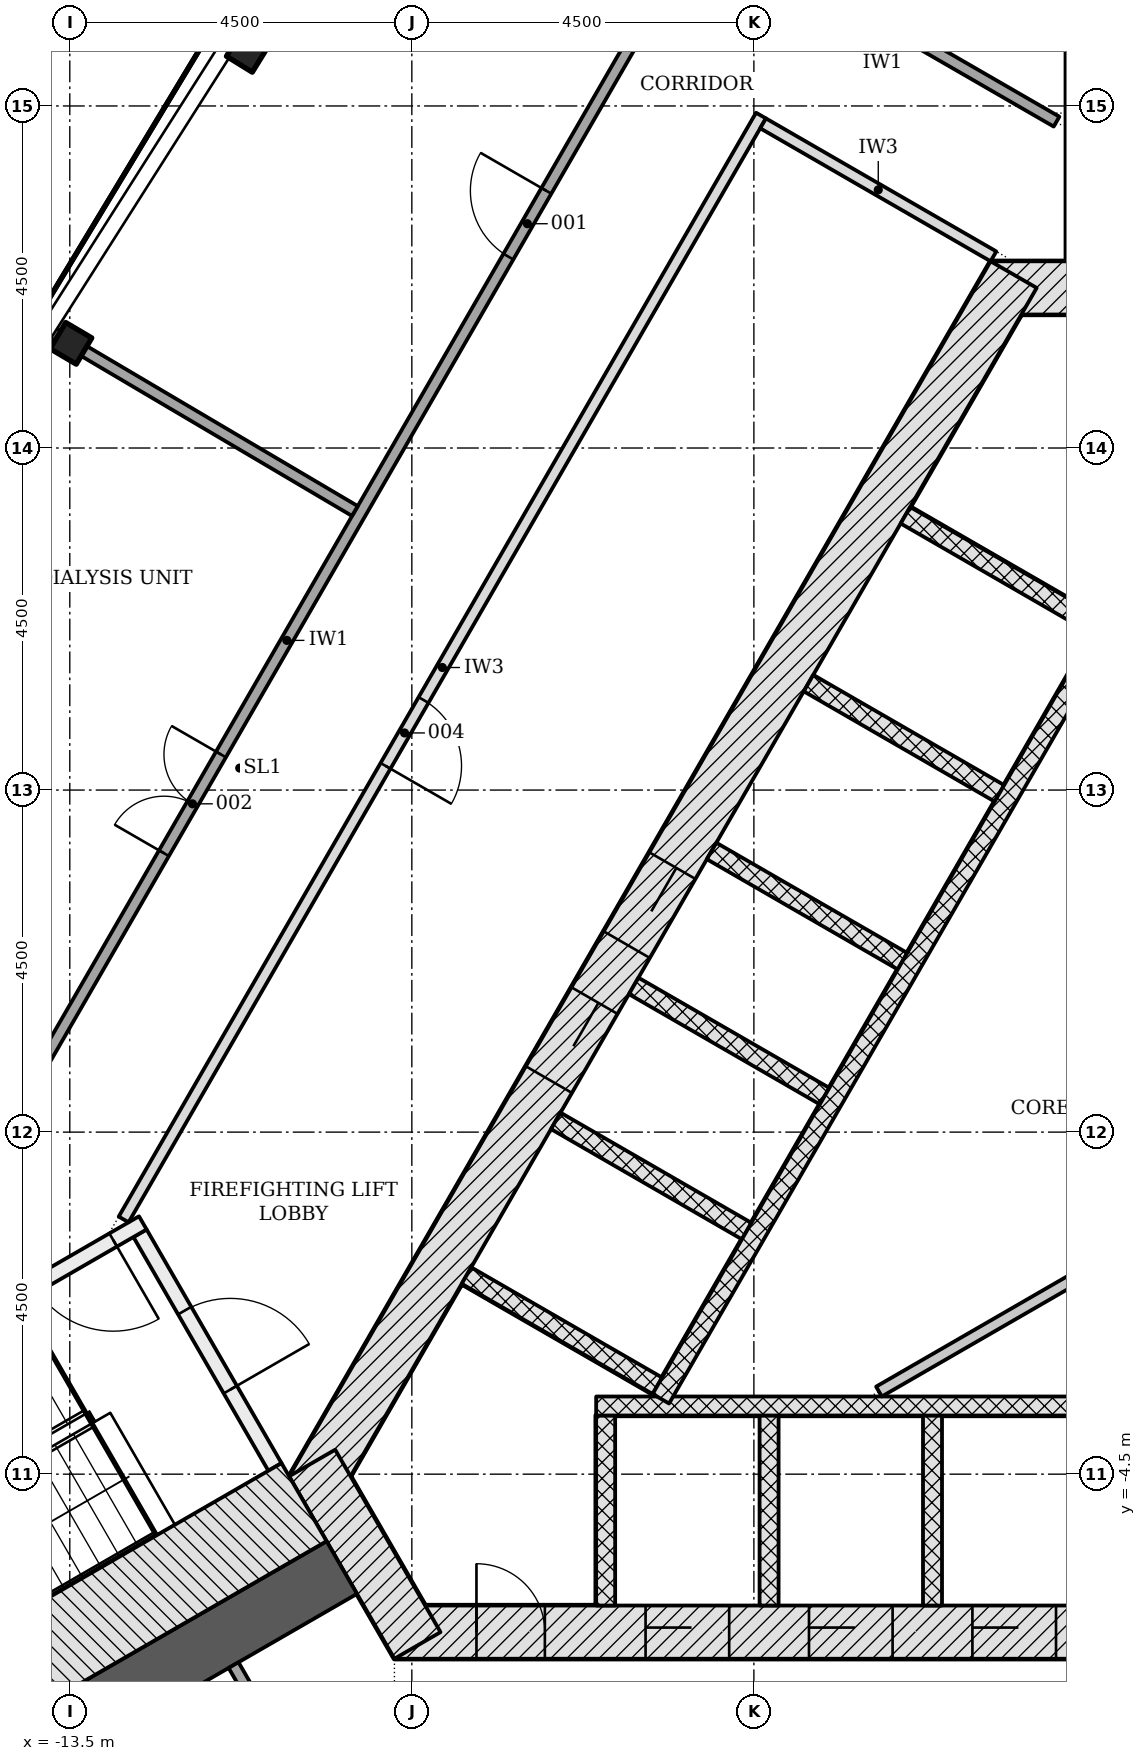
"""IFC4 building model, lengths in metres.
Left out: names, types, materials, properties, quantities, classifications, styles, units other than length and angle.
Written with IfcOpenShell. Run it as: python <this file> out.ifc"""

import sys

from ifc_helpers import new_model, si_unit, direction, frame, frame_2d, origin, origin_2d, place, context, subcontext, project, spatial, rectangle, i_section, extrude, element, fill, save


model = new_model("IFC4")
c1 = context("Model", 3, precision=1e-05, world=origin(), true_north=direction((0.0, 1.0)))
c2 = subcontext(c1, "Body", "Model", "MODEL_VIEW")
j1 = project(units=[si_unit("LENGTHUNIT", "METRE"), si_unit("PLANEANGLEUNIT", "RADIAN")], contexts=[c1])
p1 = place(None, origin())
s1 = spatial("IfcSite", under=j1, at=p1, CompositionType="ELEMENT")
p2 = place(p1, origin())
s2 = spatial("IfcBuilding", under=s1, at=p2, CompositionType="ELEMENT")
p3 = place(p2, frame((0.0, 0.0, 98.7)))
s3 = spatial("IfcBuildingStorey", under=s2, at=p3, CompositionType="ELEMENT", Elevation=98.7)
p4 = place(p3, frame((-9.229, -6.578, -0.2), z_axis=(0.0, 0.0, 1.0), x_axis=(1.0, 0.0, 0.0)))
e1 = element("IfcWall", 1, at=p4, inside=s3, PredefinedType="SHEAR", context=c2, shape_type="SweptSolid", body=[
    extrude(rectangle(XDim=18.458, YDim=0.7, at=frame_2d((9.229, 0.0))), origin(), (0.0, 0.0, 1.0), 3.6),
])
p5 = place(p4, frame((3.304, 0.0, 0.2)))
e2 = element("IfcOpeningElement", 2, at=p5, cuts=e1, PredefinedType="OPENING", context=c2, shape_type="SweptSolid", body=[
    extrude(rectangle(XDim=1.1, YDim=2.1, at=frame_2d((0.55, 1.05))), frame((0.0, 0.36, 0.0), z_axis=(0.0, -1.0, 0.0), x_axis=(1.0, 0.0, 0.0)), (0.0, 0.0, 1.0), 0.72),
])
p6 = place(p4, frame((5.454, 0.0, 0.2)))
e3 = element("IfcOpeningElement", 3, at=p6, cuts=e1, PredefinedType="OPENING", context=c2, shape_type="SweptSolid", body=[
    extrude(rectangle(XDim=1.1, YDim=2.1, at=frame_2d((0.55, 1.05))), frame((0.0, 0.36, 0.0), z_axis=(0.0, -1.0, 0.0), x_axis=(1.0, 0.0, 0.0)), (0.0, 0.0, 1.0), 0.72),
])
p7 = place(p4, frame((7.604, 0.0, 0.2)))
e4 = element("IfcOpeningElement", 4, at=p7, cuts=e1, PredefinedType="OPENING", context=c2, shape_type="SweptSolid", body=[
    extrude(rectangle(XDim=1.1, YDim=2.1, at=frame_2d((0.55, 1.05))), frame((0.0, 0.36, 0.0), z_axis=(0.0, -1.0, 0.0), x_axis=(1.0, 0.0, 0.0)), (0.0, 0.0, 1.0), 0.72),
])
p8 = place(p4, frame((9.754, 0.0, 0.2)))
e5 = element("IfcOpeningElement", 5, at=p8, cuts=e1, PredefinedType="OPENING", context=c2, shape_type="SweptSolid", body=[
    extrude(rectangle(XDim=1.1, YDim=2.1, at=frame_2d((0.55, 1.05))), frame((0.0, 0.36, 0.0), z_axis=(0.0, -1.0, 0.0), x_axis=(1.0, 0.0, 0.0)), (0.0, 0.0, 1.0), 0.72),
])
p9 = place(p4, frame((11.904, 0.0, 0.2)))
e6 = element("IfcOpeningElement", 6, at=p9, cuts=e1, PredefinedType="OPENING", context=c2, shape_type="SweptSolid", body=[
    extrude(rectangle(XDim=1.1, YDim=2.1, at=frame_2d((0.55, 1.05))), frame((0.0, 0.36, 0.0), z_axis=(0.0, -1.0, 0.0), x_axis=(1.0, 0.0, 0.0)), (0.0, 0.0, 1.0), 0.72),
])
p10 = place(p4, frame((14.054, 0.0, 0.2)))
e7 = element("IfcOpeningElement", 7, at=p10, cuts=e1, PredefinedType="OPENING", context=c2, shape_type="SweptSolid", body=[
    extrude(rectangle(XDim=1.1, YDim=2.1, at=frame_2d((0.55, 1.05))), frame((0.0, 0.36, 0.0), z_axis=(0.0, -1.0, 0.0), x_axis=(1.0, 0.0, 0.0)), (0.0, 0.0, 1.0), 0.72),
])
p11 = place(p4, frame((1.079, 0.0, 0.2)))
e8 = element("IfcOpeningElement", 8, at=p11, cuts=e1, PredefinedType="OPENING", context=c2, shape_type="SweptSolid", body=[
    extrude(rectangle(XDim=0.9, YDim=2.1, at=frame_2d((0.45, 1.05))), frame((0.0, 0.36, 0.0), z_axis=(0.0, -1.0, 0.0), x_axis=(1.0, 0.0, 0.0)), (0.0, 0.0, 1.0), 0.72),
])
p12 = place(p3, frame((1.386, 11.106, -0.2), z_axis=(0.0, 0.0, 1.0), x_axis=(-1.0, 0.0, 0.0)))
e9 = element("IfcWall", 9, at=p12, inside=s3, PredefinedType="SHEAR", context=c2, shape_type="SweptSolid", body=[
    extrude(rectangle(XDim=2.771, YDim=0.7, at=frame_2d((1.386, 0.0))), origin(), (0.0, 0.0, 1.0), 3.6),
])
p13 = place(p3, frame((-1.083, 11.281, -0.2), z_axis=(0.0, 0.0, 1.0), x_axis=(-0.500001446645, -0.866024568562, 0.0)))
e10 = element("IfcWall", 10, at=p13, inside=s3, PredefinedType="SHEAR", context=c2, shape_type="SweptSolid", body=[
    extrude(rectangle(XDim=18.458, YDim=0.7, at=frame_2d((9.229, 0.0))), origin(), (0.0, 0.0, 1.0), 3.6),
])
p14 = place(p13, frame((8.979, 0.0, 0.2)))
e11 = element("IfcOpeningElement", 11, at=p14, cuts=e10, PredefinedType="OPENING", context=c2, shape_type="SweptSolid", body=[
    extrude(rectangle(XDim=1.2, YDim=2.1, at=frame_2d((0.6, 1.05))), frame((0.0, 0.36, 0.0), z_axis=(0.0, -1.0, 0.0), x_axis=(1.0, 0.0, 0.0)), (0.0, 0.0, 1.0), 0.72),
])
p15 = place(p13, frame((11.029, 0.0, 0.2)))
e12 = element("IfcOpeningElement", 12, at=p15, cuts=e10, PredefinedType="OPENING", context=c2, shape_type="SweptSolid", body=[
    extrude(rectangle(XDim=1.2, YDim=2.1, at=frame_2d((0.6, 1.05))), frame((0.0, 0.36, 0.0), z_axis=(0.0, -1.0, 0.0), x_axis=(1.0, 0.0, 0.0)), (0.0, 0.0, 1.0), 0.72),
])
p16 = place(p3, frame((-10.311, -4.353, -0.2), z_axis=(0.0, 0.0, 1.0), x_axis=(0.500042739161, -0.866000726912, 0.0)))
e13 = element("IfcWall", 13, at=p16, inside=s3, PredefinedType="SHEAR", context=c2, shape_type="SweptSolid", body=[
    extrude(rectangle(XDim=2.771, YDim=0.7, at=frame_2d((1.386, 0.0))), origin(), (0.0, 0.0, 1.0), 3.6),
])
p17 = place(p3, frame((0.0, 11.456, -0.2), z_axis=(0.0, 0.0, 1.0), x_axis=(0.0, 1.0, 0.0)))
e14 = element("IfcWall", 14, at=p17, inside=s3, PredefinedType="SHEAR", context=c2, shape_type="SweptSolid", body=[
    extrude(rectangle(XDim=12.678, YDim=0.8, at=frame_2d((6.339, 0.0))), origin(), (0.0, 0.0, 1.0), 3.6),
])
p18 = place(p3, frame((-9.922, -5.728, -0.2), z_axis=(0.0, 0.0, 1.0), x_axis=(-0.866029086277, -0.499993621681, 0.0)))
e15 = element("IfcWall", 15, at=p18, inside=s3, PredefinedType="SHEAR", context=c2, shape_type="SweptSolid", body=[
    extrude(rectangle(XDim=12.677, YDim=0.8, at=frame_2d((6.339, 0.0))), origin(), (0.0, 0.0, 1.0), 3.6),
])
for number, where, z_axis, x_axis in (
    (16, (-11.164, 14.22, -0.2), (0.0, 0.0, 1.0), (-0.525, -0.851, 0.0)),
    (17, (-13.484, 10.377, -0.2), (0.0, 0.0, 1.0), (-0.508, -0.861, 0.0)),
):
    element("IfcColumn", number, at=place(p3, frame(where, z_axis=z_axis, x_axis=x_axis)), inside=s3, PredefinedType="COLUMN", context=c2, shape_type="SweptSolid", body=[
        extrude(i_section(OverallWidth=0.401, OverallDepth=0.399, WebThickness=0.025, FlangeThickness=0.04, FilletRadius=0.015, at=origin_2d()), origin(), (0.0, 0.0, 1.0), 3.6),
    ])
for number, where, z_axis, x_axis in (
    (18, (-6.45, -6.228, -0.2), (0.0, 0.0, 1.0), (0.0, 1.0, 0.0)),
    (19, (-4.3, -6.228, -0.2), (0.0, 0.0, 1.0), (0.0, 1.0, 0.0)),
    (20, (-2.15, -6.228, -0.2), (0.0, 0.0, 1.0), (0.0, 1.0, 0.0)),
):
    element("IfcWall", number, at=place(p3, frame(where, z_axis=z_axis, x_axis=x_axis)), inside=s3, PredefinedType="PARTITIONING", context=c2, shape_type="SweptSolid", body=[
        extrude(rectangle(XDim=2.5, YDim=0.25, at=frame_2d((1.25, 0.0))), origin(), (0.0, 0.0, 1.0), 3.6),
    ])
p19 = place(p3, frame((-6.575, -3.603, 0.0), z_axis=(0.0, 0.0, 1.0), x_axis=(1.0, 0.0, 0.0)))
e21 = element("IfcWall", 21, at=p19, inside=s3, PredefinedType="PARTITIONING", context=c2, shape_type="SweptSolid", body=[
    extrude(rectangle(XDim=13.15, YDim=0.25, at=frame_2d((6.575, 0.0))), origin(), (0.0, 0.0, 1.0), 3.4),
])
p20 = place(p3, frame((-2.506, 8.115, -0.2), z_axis=(0.0, 0.0, 1.0), x_axis=(0.865996321171, -0.50005036918, 0.0)))
e22 = element("IfcWall", 22, at=p20, inside=s3, PredefinedType="PARTITIONING", context=c2, shape_type="SweptSolid", body=[
    extrude(rectangle(XDim=2.9, YDim=0.25, at=frame_2d((1.45, 0.0))), origin(), (0.0, 0.0, 1.0), 3.6),
])
for number, where, z_axis, x_axis in (
    (23, (-3.781, 5.907, -0.2), (0.0, 0.0, 1.0), (0.866, -0.5, 0.0)),
    (24, (-5.056, 3.699, -0.2), (0.0, 0.0, 1.0), (0.866, -0.5, 0.0)),
    (25, (-6.081, 1.923, -0.2), (0.0, 0.0, 1.0), (0.866, -0.5, 0.0)),
    (26, (-7.106, 0.148, -0.2), (0.0, 0.0, 1.0), (0.866, -0.5, 0.0)),
    (27, (-8.281, -1.887, -0.2), (0.0, 0.0, 1.0), (0.866, -0.5, 0.0)),
):
    element("IfcWall", number, at=place(p3, frame(where, z_axis=z_axis, x_axis=x_axis)), inside=s3, PredefinedType="PARTITIONING", context=c2, shape_type="SweptSolid", body=[
        extrude(rectangle(XDim=2.9, YDim=0.25, at=frame_2d((1.45, 0.0))), origin(), (0.0, 0.0, 1.0), 3.6),
    ])
p21 = place(p3, frame((0.176, 6.711, 0.0), z_axis=(0.0, 0.0, 1.0), x_axis=(-0.500004227369, -0.866022963098, 0.0)))
e28 = element("IfcWall", 28, at=p21, inside=s3, PredefinedType="PARTITIONING", context=c2, shape_type="SweptSolid", body=[
    extrude(rectangle(XDim=11.8, YDim=0.25, at=frame_2d((5.9, 0.0))), origin(), (0.0, 0.0, 1.0), 3.4),
])
p22 = place(p3, frame((-2.854, -3.413, 0.0), z_axis=(0.0, 0.0, 1.0), x_axis=(0.866030102318, 0.499991861813, 0.0)))
e29 = element("IfcWall", 29, at=p22, inside=s3, PredefinedType="PARTITIONING", context=c2, shape_type="SweptSolid", body=[
    extrude(rectangle(XDim=10.407, YDim=0.15, at=frame_2d((5.204, 0.0))), origin(), (0.0, 0.0, 1.0), 3.4),
])
p23 = place(p22, frame((3.354, 0.0, 0.0)))
e30 = element("IfcOpeningElement", 30, at=p23, cuts=e29, PredefinedType="OPENING", context=c2, shape_type="SweptSolid", body=[
    extrude(rectangle(XDim=0.9, YDim=2.1, at=frame_2d((0.45, 1.05))), frame((0.0, 0.085, 0.0), z_axis=(0.0, -1.0, 0.0), x_axis=(1.0, 0.0, 0.0)), (0.0, 0.0, 1.0), 0.17),
])
p24 = place(p3, frame((-12.576, -1.331, -0.2), z_axis=(0.0, 0.0, 1.0), x_axis=(0.499970499736, -0.8660424351, 0.0)))
e31 = element("IfcWall", 31, at=p24, inside=s3, PredefinedType="SHEAR", context=c2, shape_type="SweptSolid", body=[
    extrude(rectangle(XDim=3.55, YDim=0.2, at=frame_2d((1.775, 0.0))), origin(), (0.0, 0.0, 1.0), 3.6),
])
p25 = place(p24, frame((1.175, 0.0, 0.2)))
e32 = element("IfcOpeningElement", 32, at=p25, cuts=e31, PredefinedType="OPENING", context=c2, shape_type="SweptSolid", body=[
    extrude(rectangle(XDim=1.2, YDim=2.1, at=frame_2d((0.6, 1.05))), frame((0.0, 0.11, 0.0), z_axis=(0.0, -1.0, 0.0), x_axis=(1.0, 0.0, 0.0)), (0.0, 0.0, 1.0), 0.22),
])
p26 = place(p3, frame((-12.539, -1.194, -0.2), z_axis=(0.0, 0.0, 1.0), x_axis=(-0.866045472092, -0.499965239061, 0.0)))
e33 = element("IfcWall", 33, at=p26, inside=s3, PredefinedType="SHEAR", context=c2, shape_type="SweptSolid", body=[
    extrude(rectangle(XDim=5.6, YDim=0.2, at=frame_2d((2.8, 0.0))), origin(), (0.0, 0.0, 1.0), 3.6),
])
p27 = place(p26, frame((0.45, 0.0, 0.2)))
e34 = element("IfcOpeningElement", 34, at=p27, cuts=e33, PredefinedType="OPENING", context=c2, shape_type="SweptSolid", body=[
    extrude(rectangle(XDim=1.2, YDim=2.1, at=frame_2d((0.6, 1.05))), frame((0.0, 0.11, 0.0), z_axis=(0.0, -1.0, 0.0), x_axis=(1.0, 0.0, 0.0)), (0.0, 0.0, 1.0), 0.22),
])
p28 = place(p3, frame((-10.418, -4.868, -0.2), z_axis=(0.0, 0.0, 1.0), x_axis=(-0.866018442252, -0.500012057535, 0.0)))
e35 = element("IfcWall", 35, at=p28, inside=s3, PredefinedType="SHEAR", context=c2, shape_type="SweptSolid", body=[
    extrude(rectangle(XDim=7.2, YDim=1.186, at=frame_2d((3.6, 0.0))), origin(), (0.0, 0.0, 1.0), 3.6),
])
p29 = place(p3, frame((-16.169, -3.099, 0.0), z_axis=(0.0, 0.0, 1.0), x_axis=(0.499999805269, 0.866025516212, 0.0)))
e36 = element("IfcWall", 36, at=p29, inside=s3, PredefinedType="PARTITIONING", context=c2, shape_type="SweptSolid", body=[
    extrude(rectangle(XDim=22.097, YDim=0.15, at=frame_2d((11.049, 0.0))), origin(), (0.0, 0.0, 1.0), 2.778),
])
p30 = place(p29, frame((16.878, 0.0, 0.0)))
e37 = element("IfcOpeningElement", 37, at=p30, cuts=e36, PredefinedType="OPENING", context=c2, shape_type="SweptSolid", body=[
    extrude(rectangle(XDim=1.0, YDim=2.1, at=frame_2d((0.5, 1.05))), frame((0.0, 0.085, 0.0), z_axis=(0.0, -1.0, 0.0), x_axis=(1.0, 0.0, 0.0)), (0.0, 0.0, 1.0), 0.17),
])
p31 = place(p29, frame((7.816, 0.0, 0.0)))
e38 = element("IfcOpeningElement", 38, at=p31, cuts=e36, PredefinedType="OPENING", context=c2, shape_type="SweptSolid", body=[
    extrude(rectangle(XDim=1.5, YDim=2.1, at=frame_2d((0.75, 1.05))), frame((0.0, 0.085, 0.0), z_axis=(0.0, -1.0, 0.0), x_axis=(1.0, 0.0, 0.0)), (0.0, 0.0, 1.0), 0.17),
])
p32 = place(p29, frame((1.2, 0.0, 0.0)))
e39 = element("IfcOpeningElement", 39, at=p32, cuts=e36, PredefinedType="OPENING", context=c2, shape_type="SweptSolid", body=[
    extrude(rectangle(XDim=1.5, YDim=2.1, at=frame_2d((0.75, 1.05))), frame((0.0, 0.085, 0.0), z_axis=(0.0, -1.0, 0.0), x_axis=(1.0, 0.0, 0.0)), (0.0, 0.0, 1.0), 0.17),
])
p33 = place(p3, frame((-4.407, 13.374, 0.0), z_axis=(0.0, 0.0, 1.0), x_axis=(-0.499997181693, -0.866027030928, 0.0)))
e40 = element("IfcWall", 40, at=p33, inside=s3, PredefinedType="PARTITIONING", context=c2, shape_type="SweptSolid", body=[
    extrude(rectangle(XDim=16.77, YDim=0.15, at=frame_2d((8.385, 0.0))), origin(), (0.0, 0.0, 1.0), 2.778),
])
p34 = place(p33, frame((8.879, 0.0, 0.0)))
e41 = element("IfcOpeningElement", 41, at=p34, cuts=e40, PredefinedType="OPENING", context=c2, shape_type="SweptSolid", body=[
    extrude(rectangle(XDim=1.0, YDim=2.1, at=frame_2d((0.5, 1.05))), frame((0.0, 0.085, 0.0), z_axis=(0.0, -1.0, 0.0), x_axis=(1.0, 0.0, 0.0)), (0.0, 0.0, 1.0), 0.17),
])
p35 = place(p3, frame((-5.093, 15.935, 0.0), z_axis=(0.0, 0.0, 1.0), x_axis=(0.866033195618, -0.499986503906, 0.0)))
e42 = element("IfcWall", 42, at=p35, inside=s3, PredefinedType="PARTITIONING", context=c2, shape_type="SweptSolid", body=[
    extrude(rectangle(XDim=5.282, YDim=0.15, at=frame_2d((2.641, 0.0))), origin(), (0.0, 0.0, 1.0), 3.4),
])
p36 = place(p35, frame((1.816, 0.0, 0.0)))
e43 = element("IfcOpeningElement", 43, at=p36, cuts=e42, PredefinedType="OPENING", context=c2, shape_type="SweptSolid", body=[
    extrude(rectangle(XDim=1.5, YDim=2.1, at=frame_2d((0.75, 1.05))), frame((0.0, 0.085, 0.0), z_axis=(0.0, -1.0, 0.0), x_axis=(1.0, 0.0, 0.0)), (0.0, 0.0, 1.0), 0.17),
])
p37 = place(p3, frame((-4.379, 13.271, 0.0), z_axis=(0.0, 0.0, 1.0), x_axis=(0.866019471182, -0.500010275428, 0.0)))
e44 = element("IfcWall", 44, at=p37, inside=s3, PredefinedType="PARTITIONING", context=c2, shape_type="SweptSolid", body=[
    extrude(rectangle(XDim=3.5, YDim=0.15, at=frame_2d((1.75, 0.0))), origin(), (0.0, 0.0, 1.0), 3.4),
])
p38 = place(p3, frame((-11.345, -7.012, 0.0), z_axis=(0.0, 0.0, 1.0), x_axis=(0.499998569178, -0.866026229868, 0.0)))
e45 = element("IfcWall", 45, at=p38, inside=s3, PredefinedType="PARTITIONING", context=c2, shape_type="SweptSolid", body=[
    extrude(rectangle(XDim=2.143, YDim=0.15, at=frame_2d((1.072, 0.0))), origin(), (0.0, 0.0, 1.0), 2.778),
])
p39 = place(p3, frame((-23.909, 16.533, 0.0), z_axis=(0.0, 0.0, 1.0), x_axis=(0.86106275482, -0.508498704288, 0.0)))
e46 = element("IfcWall", 46, at=p39, inside=s3, PredefinedType="PARTITIONING", context=c2, shape_type="SweptSolid", body=[
    extrude(rectangle(XDim=16.444, YDim=0.15, at=frame_2d((8.222, 0.0))), origin(), (0.0, 0.0, 1.0), 2.778),
])
p40 = place(p5, origin())
e47 = element("IfcDoor", 47, at=p40, inside=s3, OperationType="DOUBLE_DOOR_SLIDING", PredefinedType="DOOR", context=c2, shape_type="SweptSolid", body=[
    extrude(rectangle(XDim=1.1, YDim=2.1, at=frame_2d((0.55, 1.05))), frame((0.0, 0.025, 0.0), z_axis=(0.0, -1.0, 0.0), x_axis=(1.0, 0.0, 0.0)), (0.0, 0.0, 1.0), 0.05),
])
fill(e2, e47)
p41 = place(p6, origin())
e48 = element("IfcDoor", 48, at=p41, inside=s3, OperationType="DOUBLE_DOOR_SLIDING", PredefinedType="DOOR", context=c2, shape_type="SweptSolid", body=[
    extrude(rectangle(XDim=1.1, YDim=2.1, at=frame_2d((0.55, 1.05))), frame((0.0, 0.025, 0.0), z_axis=(0.0, -1.0, 0.0), x_axis=(1.0, 0.0, 0.0)), (0.0, 0.0, 1.0), 0.05),
])
fill(e3, e48)
p42 = place(p7, origin())
e49 = element("IfcDoor", 49, at=p42, inside=s3, OperationType="DOUBLE_DOOR_SLIDING", PredefinedType="DOOR", context=c2, shape_type="SweptSolid", body=[
    extrude(rectangle(XDim=1.1, YDim=2.1, at=frame_2d((0.55, 1.05))), frame((0.0, 0.025, 0.0), z_axis=(0.0, -1.0, 0.0), x_axis=(1.0, 0.0, 0.0)), (0.0, 0.0, 1.0), 0.05),
])
fill(e4, e49)
p43 = place(p14, origin())
e50 = element("IfcDoor", 50, at=p43, inside=s3, OperationType="DOUBLE_DOOR_SLIDING", PredefinedType="DOOR", context=c2, shape_type="SweptSolid", body=[
    extrude(rectangle(XDim=1.2, YDim=2.1, at=frame_2d((0.6, 1.05))), frame((0.0, 0.025, 0.0), z_axis=(0.0, -1.0, 0.0), x_axis=(1.0, 0.0, 0.0)), (0.0, 0.0, 1.0), 0.05),
])
fill(e11, e50)
p44 = place(p15, origin())
e51 = element("IfcDoor", 51, at=p44, inside=s3, OperationType="DOUBLE_DOOR_SLIDING", PredefinedType="DOOR", context=c2, shape_type="SweptSolid", body=[
    extrude(rectangle(XDim=1.2, YDim=2.1, at=frame_2d((0.6, 1.05))), frame((0.0, 0.025, 0.0), z_axis=(0.0, -1.0, 0.0), x_axis=(1.0, 0.0, 0.0)), (0.0, 0.0, 1.0), 0.05),
])
fill(e12, e51)
p45 = place(p11, origin())
e52 = element("IfcDoor", 52, at=p45, inside=s3, OperationType="SINGLE_SWING_LEFT", PredefinedType="DOOR", context=c2, shape_type="SweptSolid", body=[
    extrude(rectangle(XDim=0.9, YDim=2.1, at=frame_2d((0.45, 1.05))), frame((0.0, 0.075, 0.0), z_axis=(0.0, -1.0, 0.0), x_axis=(1.0, 0.0, 0.0)), (0.0, 0.0, 1.0), 0.15),
])
fill(e8, e52)
p46 = place(p25, origin())
e53 = element("IfcDoor", 53, at=p46, inside=s3, OperationType="SINGLE_SWING_RIGHT", PredefinedType="DOOR", context=c2, shape_type="SweptSolid", body=[
    extrude(rectangle(XDim=1.2, YDim=2.1, at=frame_2d((0.6, 1.05))), frame((0.0, 0.025, 0.0), z_axis=(0.0, -1.0, 0.0), x_axis=(1.0, 0.0, 0.0)), (0.0, 0.0, 1.0), 0.05),
])
fill(e32, e53)
p47 = place(p27, origin())
e54 = element("IfcDoor", 54, at=p47, inside=s3, OperationType="SINGLE_SWING_LEFT", PredefinedType="DOOR", context=c2, shape_type="SweptSolid", body=[
    extrude(rectangle(XDim=1.2, YDim=2.1, at=frame_2d((0.6, 1.05))), frame((0.0, 0.025, 0.0), z_axis=(0.0, -1.0, 0.0), x_axis=(1.0, 0.0, 0.0)), (0.0, 0.0, 1.0), 0.05),
])
fill(e34, e54)
p48 = place(p30, origin())
e55 = element("IfcDoor", 55, at=p48, inside=s3, OperationType="SINGLE_SWING_RIGHT", PredefinedType="DOOR", context=c2, shape_type="SweptSolid", body=[
    extrude(rectangle(XDim=1.0, YDim=2.1, at=frame_2d((0.5, 1.05))), frame((0.0, 0.025, 0.0), z_axis=(0.0, -1.0, 0.0), x_axis=(1.0, 0.0, 0.0)), (0.0, 0.0, 1.0), 0.05),
])
fill(e37, e55)
p49 = place(p31, origin())
e56 = element("IfcDoor", 56, at=p49, inside=s3, OperationType="DOUBLE_DOOR_SINGLE_SWING", PredefinedType="DOOR", context=c2, shape_type="SweptSolid", body=[
    extrude(rectangle(XDim=1.5, YDim=2.1, at=frame_2d((0.75, 1.05))), frame((0.0, 0.025, 0.0), z_axis=(0.0, -1.0, 0.0), x_axis=(1.0, 0.0, 0.0)), (0.0, 0.0, 1.0), 0.05),
])
fill(e38, e56)
p50 = place(p34, origin())
e57 = element("IfcDoor", 57, at=p50, inside=s3, OperationType="SINGLE_SWING_RIGHT", PredefinedType="DOOR", context=c2, shape_type="SweptSolid", body=[
    extrude(rectangle(XDim=1.0, YDim=2.1, at=frame_2d((0.5, 1.05))), frame((0.0, 0.025, 0.0), z_axis=(0.0, -1.0, 0.0), x_axis=(1.0, 0.0, 0.0)), (0.0, 0.0, 1.0), 0.05),
])
fill(e41, e57)
save(model, sys.argv[1])
